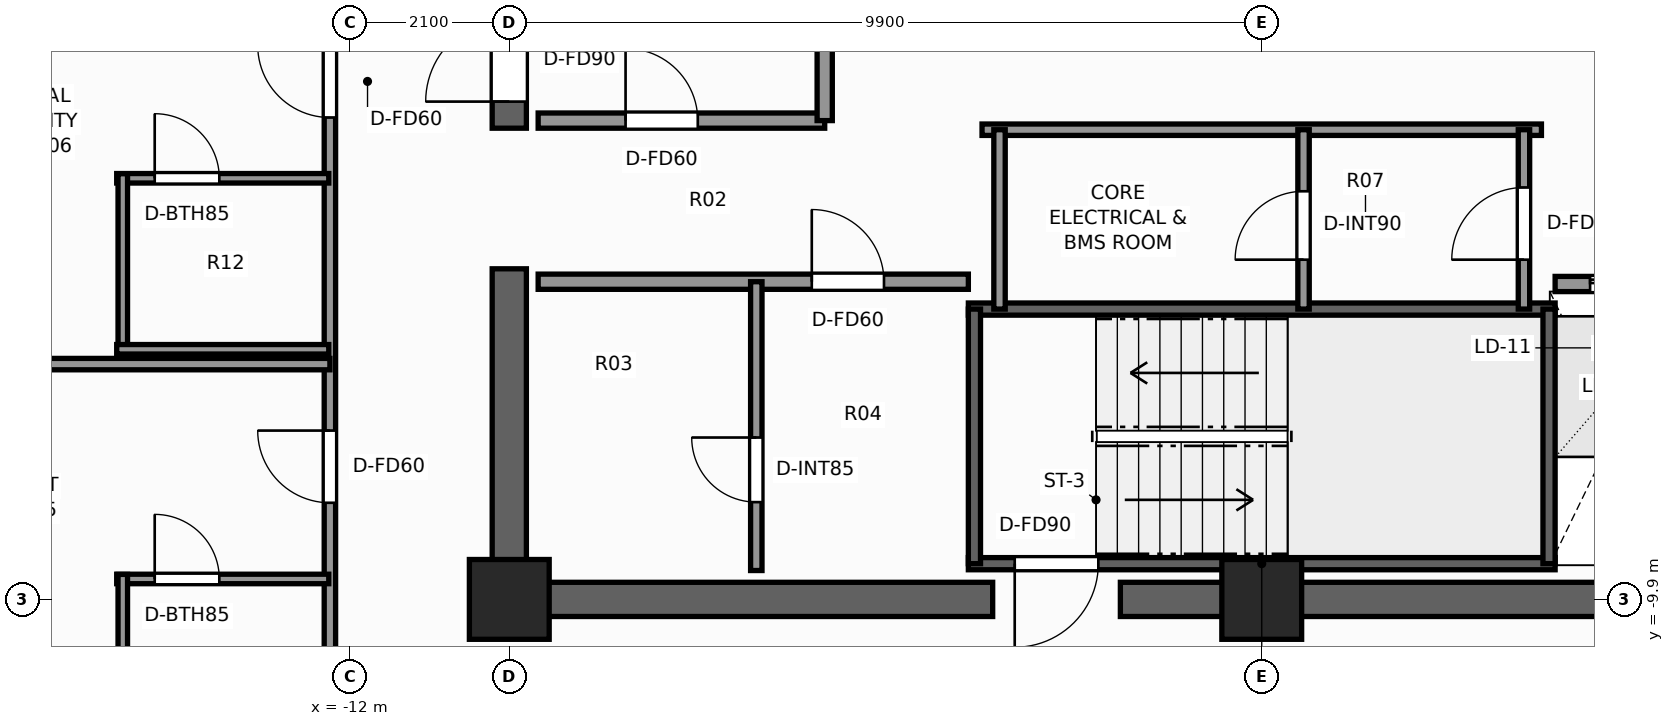
"""IFC4 building model, lengths in metres.
Left out: names, types, materials, properties, quantities, classifications, styles, units other than length and angle.
Written with IfcOpenShell. Run it as: python <this file> out.ifc"""

import sys

from ifc_helpers import new_model, si_unit, direction, frame, frame_2d, origin, origin_2d, place, context, subcontext, project, spatial, rectangle, extrude, element, fill, save


model = new_model("IFC4")
c1 = context("Model", 3, precision=1e-05, world=origin(), true_north=direction((0.0, 1.0)))
c2 = subcontext(c1, "Body", "Model", "MODEL_VIEW")
j1 = project(units=[si_unit("LENGTHUNIT", "METRE"), si_unit("PLANEANGLEUNIT", "RADIAN")], contexts=[c1])
p1 = place(None, origin())
s1 = spatial("IfcSite", under=j1, at=p1, CompositionType="ELEMENT")
p2 = place(p1, origin())
s2 = spatial("IfcBuilding", under=s1, at=p2, CompositionType="ELEMENT")
p3 = place(p2, frame((0.0, 0.0, 251.4)))
s3 = spatial("IfcBuildingStorey", under=s2, at=p3, CompositionType="ELEMENT", Elevation=251.4)
p4 = place(p3, frame((10.125, -9.9, 0.0), z_axis=(0.0, 0.0, 1.0), x_axis=(-1.0, 0.0, 0.0)))
e1 = element("IfcWall", 1, at=p4, inside=s3, PredefinedType="SHEAR", context=c2, shape_type="SweptSolid", body=[
    extrude(rectangle(XDim=11.985, YDim=0.45, at=frame_2d((5.993, 0.0))), origin(), (0.0, 0.0, 1.0), 3.5),
])
p5 = place(p3, frame((-3.54, -9.9, 0.0), z_axis=(0.0, 0.0, 1.0), x_axis=(-1.0, 0.0, 0.0)))
e2 = element("IfcWall", 2, at=p5, inside=s3, PredefinedType="SHEAR", context=c2, shape_type="SweptSolid", body=[
    extrude(rectangle(XDim=6.585, YDim=0.45, at=frame_2d((3.292, 0.0))), origin(), (0.0, 0.0, 1.0), 3.5),
])
p6 = place(p3, frame((-9.9, -9.675, 0.0), z_axis=(0.0, 0.0, 1.0), x_axis=(0.0, 1.0, 0.0)))
e3 = element("IfcWall", 3, at=p6, inside=s3, PredefinedType="SHEAR", context=c2, shape_type="SweptSolid", body=[
    extrude(rectangle(XDim=4.125, YDim=0.45, at=frame_2d((2.062, 0.0))), origin(), (0.0, 0.0, 1.0), 3.5),
])
p7 = place(p3, frame((-9.9, -3.7, 0.0), z_axis=(0.0, 0.0, 1.0), x_axis=(0.0, 1.0, 0.0)))
e4 = element("IfcWall", 4, at=p7, inside=s3, PredefinedType="SHEAR", context=c2, shape_type="SweptSolid", body=[
    extrude(rectangle(XDim=13.375, YDim=0.45, at=frame_2d((6.688, 0.0))), origin(), (0.0, 0.0, 1.0), 3.5),
])
p8 = place(p7, frame((0.35, 0.0, 0.0)))
e5 = element("IfcOpeningElement", 5, at=p8, cuts=e4, PredefinedType="OPENING", context=c2, shape_type="SweptSolid", body=[
    extrude(rectangle(XDim=1.1, YDim=2.2, at=frame_2d((0.55, 1.1))), frame((0.0, 0.235, 0.0), z_axis=(0.0, -1.0, 0.0), x_axis=(1.0, 0.0, 0.0)), (0.0, 0.0, 1.0), 0.47),
])
for number, where, z_axis, x_axis in (
    (6, (-9.9, -9.9, 0.0), (0.0, 0.0, 1.0), (1.0, 0.0, 0.0)),
    (7, (0.0, -9.9, 0.0), (0.0, 0.0, 1.0), (1.0, 0.0, 0.0)),
):
    element("IfcColumn", number, at=place(p3, frame(where, z_axis=z_axis, x_axis=x_axis)), inside=s3, PredefinedType="COLUMN", context=c2, shape_type="SweptSolid", body=[
        extrude(rectangle(XDim=1.05, YDim=1.05, at=origin_2d()), origin(), (0.0, 0.0, 1.0), 3.5),
    ])
p9 = place(p3, frame((3.86, -9.43, 0.0), z_axis=(0.0, 0.0, 1.0), x_axis=(-1.0, 0.0, 0.0)))
e8 = element("IfcWall", 8, at=p9, inside=s3, PredefinedType="SHEAR", context=c2, shape_type="SweptSolid", body=[
    extrude(rectangle(XDim=7.72, YDim=0.16, at=frame_2d((3.86, 0.0))), origin(), (0.0, 0.0, 1.0), 3.5),
])
p10 = place(p9, frame((6.01, 0.0, 0.0)))
e9 = element("IfcOpeningElement", 9, at=p10, cuts=e8, PredefinedType="OPENING", context=c2, shape_type="SweptSolid", body=[
    extrude(rectangle(XDim=1.1, YDim=2.2, at=frame_2d((0.55, 1.1))), frame((0.0, 0.09, 0.0), z_axis=(0.0, -1.0, 0.0), x_axis=(1.0, 0.0, 0.0)), (0.0, 0.0, 1.0), 0.18),
])
p11 = place(p3, frame((-3.86, -6.08, 0.0), z_axis=(0.0, 0.0, 1.0), x_axis=(1.0, 0.0, 0.0)))
e10 = element("IfcWall", 10, at=p11, inside=s3, PredefinedType="SHEAR", context=c2, shape_type="SweptSolid", body=[
    extrude(rectangle(XDim=7.72, YDim=0.16, at=frame_2d((3.86, 0.0))), origin(), (0.0, 0.0, 1.0), 3.5),
])
for number, where, z_axis, x_axis in (
    (11, (-3.78, -9.43, 0.0), (0.0, 0.0, 1.0), (0.0, 1.0, 0.0)),
    (12, (3.78, -9.43, 0.0), (0.0, 0.0, 1.0), (0.0, 1.0, 0.0)),
):
    element("IfcWall", number, at=place(p3, frame(where, z_axis=z_axis, x_axis=x_axis)), inside=s3, PredefinedType="SHEAR", context=c2, shape_type="SweptSolid", body=[
        extrude(rectangle(XDim=3.35, YDim=0.16, at=frame_2d((1.675, 0.0))), origin(), (0.0, 0.0, 1.0), 3.5),
    ])
p12 = place(p3, frame((-9.52, -3.6, 0.0), z_axis=(0.0, 0.0, 1.0), x_axis=(1.0, 0.0, 0.0)))
e13 = element("IfcWall", 13, at=p12, inside=s3, PredefinedType="SOLIDWALL", context=c2, shape_type="SweptSolid", body=[
    extrude(rectangle(XDim=3.77, YDim=0.2, at=frame_2d((1.885, 0.0))), origin(), (0.0, 0.0, 1.0), 3.25),
])
p13 = place(p12, frame((1.15, 0.0, 0.0)))
e14 = element("IfcOpeningElement", 14, at=p13, cuts=e13, PredefinedType="OPENING", context=c2, shape_type="SweptSolid", body=[
    extrude(rectangle(XDim=0.95, YDim=2.06, at=frame_2d((0.475, 1.03))), frame((0.0, 0.11, 0.0), z_axis=(0.0, -1.0, 0.0), x_axis=(1.0, 0.0, 0.0)), (0.0, 0.0, 1.0), 0.22),
])
p14 = place(p3, frame((-5.75, -3.6, 0.0), z_axis=(0.0, 0.0, 1.0), x_axis=(0.0, 1.0, 0.0)))
e15 = element("IfcWall", 15, at=p14, inside=s3, PredefinedType="SOLIDWALL", context=c2, shape_type="SweptSolid", body=[
    extrude(rectangle(XDim=5.57, YDim=0.2, at=frame_2d((2.785, 0.0))), origin(), (0.0, 0.0, 1.0), 3.25),
])
p15 = place(p14, frame((2.75, 0.0, 0.0)))
e16 = element("IfcOpeningElement", 16, at=p15, cuts=e15, PredefinedType="OPENING", context=c2, shape_type="SweptSolid", body=[
    extrude(rectangle(XDim=1.1, YDim=2.2, at=frame_2d((0.55, 1.1))), frame((0.0, 0.11, 0.0), z_axis=(0.0, -1.0, 0.0), x_axis=(1.0, 0.0, 0.0)), (0.0, 0.0, 1.0), 0.22),
])
p16 = place(p3, frame((-9.52, -5.72, 0.0), z_axis=(0.0, 0.0, 1.0), x_axis=(1.0, 0.0, 0.0)))
e17 = element("IfcWall", 17, at=p16, inside=s3, PredefinedType="SOLIDWALL", context=c2, shape_type="SweptSolid", body=[
    extrude(rectangle(XDim=5.66, YDim=0.2, at=frame_2d((2.83, 0.0))), origin(), (0.0, 0.0, 1.0), 3.25),
])
p17 = place(p16, frame((3.6, 0.0, 0.0)))
e18 = element("IfcOpeningElement", 18, at=p17, cuts=e17, PredefinedType="OPENING", context=c2, shape_type="SweptSolid", body=[
    extrude(rectangle(XDim=0.95, YDim=2.06, at=frame_2d((0.475, 1.03))), frame((0.0, 0.11, 0.0), z_axis=(0.0, -1.0, 0.0), x_axis=(1.0, 0.0, 0.0)), (0.0, 0.0, 1.0), 0.22),
])
p18 = place(p3, frame((-6.65, -9.52, 0.0), z_axis=(0.0, 0.0, 1.0), x_axis=(0.0, 1.0, 0.0)))
e19 = element("IfcWall", 19, at=p18, inside=s3, PredefinedType="PARTITIONING", context=c2, shape_type="SweptSolid", body=[
    extrude(rectangle(XDim=3.8, YDim=0.15, at=frame_2d((1.9, 0.0))), origin(), (0.0, 0.0, 1.0), 3.25),
])
p19 = place(p18, frame((0.9, 0.0, 0.0)))
e20 = element("IfcOpeningElement", 20, at=p19, cuts=e19, PredefinedType="OPENING", context=c2, shape_type="SweptSolid", body=[
    extrude(rectangle(XDim=0.85, YDim=2.03, at=frame_2d((0.425, 1.015))), frame((0.0, 0.085, 0.0), z_axis=(0.0, -1.0, 0.0), x_axis=(1.0, 0.0, 0.0)), (0.0, 0.0, 1.0), 0.17),
])
p20 = place(p3, frame((3.86, -5.75, 0.0), z_axis=(0.0, 0.0, 1.0), x_axis=(1.0, 0.0, 0.0)))
e21 = element("IfcWall", 21, at=p20, inside=s3, PredefinedType="SOLIDWALL", context=c2, shape_type="SweptSolid", body=[
    extrude(rectangle(XDim=5.66, YDim=0.2, at=frame_2d((2.83, 0.0))), origin(), (0.0, 0.0, 1.0), 3.25),
])
p21 = place(p20, frame((0.46, 0.0, 0.0)))
e22 = element("IfcOpeningElement", 22, at=p21, cuts=e21, PredefinedType="OPENING", context=c2, shape_type="SweptSolid", body=[
    extrude(rectangle(XDim=1.1, YDim=2.2, at=frame_2d((0.55, 1.1))), frame((0.0, 0.11, 0.0), z_axis=(0.0, -1.0, 0.0), x_axis=(1.0, 0.0, 0.0)), (0.0, 0.0, 1.0), 0.22),
])
p22 = place(p20, frame((2.39, 0.0, 0.0)))
e23 = element("IfcOpeningElement", 23, at=p22, cuts=e21, PredefinedType="OPENING", context=c2, shape_type="SweptSolid", body=[
    extrude(rectangle(XDim=1.1, YDim=2.2, at=frame_2d((0.55, 1.1))), frame((0.0, 0.11, 0.0), z_axis=(0.0, -1.0, 0.0), x_axis=(1.0, 0.0, 0.0)), (0.0, 0.0, 1.0), 0.22),
])
p23 = place(p20, frame((4.32, 0.0, 0.0)))
e24 = element("IfcOpeningElement", 24, at=p23, cuts=e21, PredefinedType="OPENING", context=c2, shape_type="SweptSolid", body=[
    extrude(rectangle(XDim=1.1, YDim=2.2, at=frame_2d((0.55, 1.1))), frame((0.0, 0.11, 0.0), z_axis=(0.0, -1.0, 0.0), x_axis=(1.0, 0.0, 0.0)), (0.0, 0.0, 1.0), 0.22),
])
p24 = place(p3, frame((-3.68, -3.72, 0.0), z_axis=(0.0, 0.0, 1.0), x_axis=(1.0, 0.0, 0.0)))
e25 = element("IfcWall", 25, at=p24, inside=s3, PredefinedType="PARTITIONING", context=c2, shape_type="SweptSolid", body=[
    extrude(rectangle(XDim=7.36, YDim=0.15, at=frame_2d((3.68, 0.0))), origin(), (0.0, 0.0, 1.0), 3.25),
])
p25 = place(p3, frame((3.45, -6.08, 0.0), z_axis=(0.0, 0.0, 1.0), x_axis=(0.0, 1.0, 0.0)))
e26 = element("IfcWall", 26, at=p25, inside=s3, PredefinedType="PARTITIONING", context=c2, shape_type="SweptSolid", body=[
    extrude(rectangle(XDim=2.36, YDim=0.15, at=frame_2d((1.18, 0.0))), origin(), (0.0, 0.0, 1.0), 3.25),
])
p26 = place(p25, frame((0.65, 0.0, 0.0)))
e27 = element("IfcOpeningElement", 27, at=p26, cuts=e26, PredefinedType="OPENING", context=c2, shape_type="SweptSolid", body=[
    extrude(rectangle(XDim=0.95, YDim=2.06, at=frame_2d((0.475, 1.03))), frame((0.0, 0.085, 0.0), z_axis=(0.0, -1.0, 0.0), x_axis=(1.0, 0.0, 0.0)), (0.0, 0.0, 1.0), 0.17),
])
p27 = place(p3, frame((-3.45, -6.08, 0.0), z_axis=(0.0, 0.0, 1.0), x_axis=(0.0, 1.0, 0.0)))
e28 = element("IfcWall", 28, at=p27, inside=s3, PredefinedType="PARTITIONING", context=c2, shape_type="SweptSolid", body=[
    extrude(rectangle(XDim=2.36, YDim=0.15, at=frame_2d((1.18, 0.0))), origin(), (0.0, 0.0, 1.0), 3.25),
])
p28 = place(p3, frame((0.55, -6.08, 0.0), z_axis=(0.0, 0.0, 1.0), x_axis=(0.0, 1.0, 0.0)))
e29 = element("IfcWall", 29, at=p28, inside=s3, PredefinedType="PARTITIONING", context=c2, shape_type="SweptSolid", body=[
    extrude(rectangle(XDim=2.36, YDim=0.15, at=frame_2d((1.18, 0.0))), origin(), (0.0, 0.0, 1.0), 3.25),
])
p29 = place(p28, frame((0.65, 0.0, 0.0)))
e30 = element("IfcOpeningElement", 30, at=p29, cuts=e29, PredefinedType="OPENING", context=c2, shape_type="SweptSolid", body=[
    extrude(rectangle(XDim=0.9, YDim=2.06, at=frame_2d((0.45, 1.03))), frame((0.0, 0.085, 0.0), z_axis=(0.0, -1.0, 0.0), x_axis=(1.0, 0.0, 0.0)), (0.0, 0.0, 1.0), 0.17),
])
p30 = place(p3, frame((-12.26, -12.26, 0.0), z_axis=(0.0, 0.0, 1.0), x_axis=(0.0, 1.0, 0.0)))
e31 = element("IfcWall", 31, at=p30, inside=s3, PredefinedType="PARTITIONING", context=c2, shape_type="SweptSolid", body=[
    extrude(rectangle(XDim=24.84, YDim=0.15, at=frame_2d((12.42, 0.0))), origin(), (0.0, 0.0, 1.0), 2.539),
])
p31 = place(p30, frame((3.631, 0.0, 0.0)))
e32 = element("IfcOpeningElement", 32, at=p31, cuts=e31, PredefinedType="OPENING", context=c2, shape_type="SweptSolid", body=[
    extrude(rectangle(XDim=0.95, YDim=2.06, at=frame_2d((0.475, 1.03))), frame((0.0, 0.085, 0.0), z_axis=(0.0, -1.0, 0.0), x_axis=(1.0, 0.0, 0.0)), (0.0, 0.0, 1.0), 0.17),
])
p32 = place(p30, frame((8.701, 0.0, 0.0)))
e33 = element("IfcOpeningElement", 33, at=p32, cuts=e31, PredefinedType="OPENING", context=c2, shape_type="SweptSolid", body=[
    extrude(rectangle(XDim=0.95, YDim=2.06, at=frame_2d((0.475, 1.03))), frame((0.0, 0.085, 0.0), z_axis=(0.0, -1.0, 0.0), x_axis=(1.0, 0.0, 0.0)), (0.0, 0.0, 1.0), 0.17),
])
p33 = place(p30, frame((14.031, 0.0, 0.0)))
e34 = element("IfcOpeningElement", 34, at=p33, cuts=e31, PredefinedType="OPENING", context=c2, shape_type="SweptSolid", body=[
    extrude(rectangle(XDim=0.95, YDim=2.06, at=frame_2d((0.475, 1.03))), frame((0.0, 0.085, 0.0), z_axis=(0.0, -1.0, 0.0), x_axis=(1.0, 0.0, 0.0)), (0.0, 0.0, 1.0), 0.17),
])
p34 = place(p30, frame((19.741, 0.0, 0.0)))
e35 = element("IfcOpeningElement", 35, at=p34, cuts=e31, PredefinedType="OPENING", context=c2, shape_type="SweptSolid", body=[
    extrude(rectangle(XDim=0.95, YDim=2.06, at=frame_2d((0.475, 1.03))), frame((0.0, 0.085, 0.0), z_axis=(0.0, -1.0, 0.0), x_axis=(1.0, 0.0, 0.0)), (0.0, 0.0, 1.0), 0.17),
])
p35 = place(p3, frame((-18.38, -6.804, 0.0), z_axis=(0.0, 0.0, 1.0), x_axis=(1.0, 0.0, 0.0)))
e36 = element("IfcWall", 36, at=p35, inside=s3, PredefinedType="PARTITIONING", context=c2, shape_type="SweptSolid", body=[
    extrude(rectangle(XDim=6.12, YDim=0.15, at=frame_2d((3.06, 0.0))), origin(), (0.0, 0.0, 1.0), 2.623),
])
p36 = place(p3, frame((-15.065, -9.631, 0.0), z_axis=(0.0, 0.0, 1.0), x_axis=(1.0, 0.0, 0.0)))
e37 = element("IfcWall", 37, at=p36, inside=s3, PredefinedType="PARTITIONING", context=c2, shape_type="SweptSolid", body=[
    extrude(rectangle(XDim=2.79, YDim=0.125, at=frame_2d((1.395, 0.0))), origin(), (0.0, 0.0, 1.0), 3.25),
])
p37 = place(p36, frame((0.5, 0.0, 0.0)))
e38 = element("IfcOpeningElement", 38, at=p37, cuts=e37, PredefinedType="OPENING", context=c2, shape_type="SweptSolid", body=[
    extrude(rectangle(XDim=0.85, YDim=2.03, at=frame_2d((0.425, 1.015))), frame((0.0, 0.073, 0.0), z_axis=(0.0, -1.0, 0.0), x_axis=(1.0, 0.0, 0.0)), (0.0, 0.0, 1.0), 0.145),
])
p38 = place(p3, frame((-14.985, -11.941, 0.0), z_axis=(0.0, 0.0, 1.0), x_axis=(0.0, 1.0, 0.0)))
e39 = element("IfcWall", 39, at=p38, inside=s3, PredefinedType="PARTITIONING", context=c2, shape_type="SweptSolid", body=[
    extrude(rectangle(XDim=2.37, YDim=0.125, at=frame_2d((1.185, 0.0))), origin(), (0.0, 0.0, 1.0), 2.539),
])
p39 = place(p3, frame((-15.065, -4.359, 0.0), z_axis=(0.0, 0.0, 1.0), x_axis=(1.0, 0.0, 0.0)))
e40 = element("IfcWall", 40, at=p39, inside=s3, PredefinedType="PARTITIONING", context=c2, shape_type="SweptSolid", body=[
    extrude(rectangle(XDim=2.79, YDim=0.125, at=frame_2d((1.395, 0.0))), origin(), (0.0, 0.0, 1.0), 2.539),
])
p40 = place(p39, frame((0.5, 0.0, 0.0)))
e41 = element("IfcOpeningElement", 41, at=p40, cuts=e40, PredefinedType="OPENING", context=c2, shape_type="SweptSolid", body=[
    extrude(rectangle(XDim=0.85, YDim=2.03, at=frame_2d((0.425, 1.015))), frame((0.0, 0.073, 0.0), z_axis=(0.0, -1.0, 0.0), x_axis=(1.0, 0.0, 0.0)), (0.0, 0.0, 1.0), 0.145),
])
p41 = place(p3, frame((-14.985, -6.669, 0.0), z_axis=(0.0, 0.0, 1.0), x_axis=(0.0, 1.0, 0.0)))
e42 = element("IfcWall", 42, at=p41, inside=s3, PredefinedType="PARTITIONING", context=c2, shape_type="SweptSolid", body=[
    extrude(rectangle(XDim=2.37, YDim=0.125, at=frame_2d((1.185, 0.0))), origin(), (0.0, 0.0, 1.0), 2.539),
])
p42 = place(p3, frame((-15.065, -6.609, 0.0), z_axis=(0.0, 0.0, 1.0), x_axis=(1.0, 0.0, 0.0)))
e43 = element("IfcWall", 43, at=p42, inside=s3, PredefinedType="PARTITIONING", context=c2, shape_type="SweptSolid", body=[
    extrude(rectangle(XDim=2.79, YDim=0.125, at=frame_2d((1.395, 0.0))), origin(), (0.0, 0.0, 1.0), 3.25),
])
p43 = place(p10, origin())
e44 = element("IfcDoor", 44, at=p43, inside=s3, OperationType="SINGLE_SWING_RIGHT", PredefinedType="DOOR", context=c2, shape_type="SweptSolid", body=[
    extrude(rectangle(XDim=1.1, YDim=2.2, at=frame_2d((0.55, 1.1))), frame((0.0, 0.025, 0.0), z_axis=(0.0, -1.0, 0.0), x_axis=(1.0, 0.0, 0.0)), (0.0, 0.0, 1.0), 0.05),
])
fill(e9, e44)
p44 = place(p8, origin())
e45 = element("IfcDoor", 45, at=p44, inside=s3, OperationType="SINGLE_SWING_LEFT", PredefinedType="DOOR", context=c2, shape_type="SweptSolid", body=[
    extrude(rectangle(XDim=1.1, YDim=2.2, at=frame_2d((0.55, 1.1))), frame((0.0, 0.025, 0.0), z_axis=(0.0, -1.0, 0.0), x_axis=(1.0, 0.0, 0.0)), (0.0, 0.0, 1.0), 0.05),
])
fill(e5, e45)
p45 = place(p17, origin())
e46 = element("IfcDoor", 46, at=p45, inside=s3, OperationType="SINGLE_SWING_LEFT", PredefinedType="DOOR", context=c2, shape_type="SweptSolid", body=[
    extrude(rectangle(XDim=0.95, YDim=2.06, at=frame_2d((0.475, 1.03))), frame((0.0, 0.025, 0.0), z_axis=(0.0, -1.0, 0.0), x_axis=(1.0, 0.0, 0.0)), (0.0, 0.0, 1.0), 0.05),
])
fill(e18, e46)
p46 = place(p19, origin())
e47 = element("IfcDoor", 47, at=p46, inside=s3, OperationType="SINGLE_SWING_RIGHT", PredefinedType="DOOR", context=c2, shape_type="SweptSolid", body=[
    extrude(rectangle(XDim=0.85, YDim=2.03, at=frame_2d((0.425, 1.015))), frame((0.0, 0.025, 0.0), z_axis=(0.0, -1.0, 0.0), x_axis=(1.0, 0.0, 0.0)), (0.0, 0.0, 1.0), 0.05),
])
fill(e20, e47)
p47 = place(p13, origin())
e48 = element("IfcDoor", 48, at=p47, inside=s3, OperationType="SINGLE_SWING_LEFT", PredefinedType="DOOR", context=c2, shape_type="SweptSolid", body=[
    extrude(rectangle(XDim=0.95, YDim=2.06, at=frame_2d((0.475, 1.03))), frame((0.0, 0.025, 0.0), z_axis=(0.0, -1.0, 0.0), x_axis=(1.0, 0.0, 0.0)), (0.0, 0.0, 1.0), 0.05),
])
fill(e14, e48)
p48 = place(p21, origin())
e49 = element("IfcDoor", 49, at=p48, inside=s3, OperationType="DOUBLE_DOOR_SLIDING", PredefinedType="DOOR", context=c2, shape_type="SweptSolid", body=[
    extrude(rectangle(XDim=1.1, YDim=2.2, at=frame_2d((0.55, 1.1))), frame((0.0, 0.025, 0.0), z_axis=(0.0, -1.0, 0.0), x_axis=(1.0, 0.0, 0.0)), (0.0, 0.0, 1.0), 0.05),
])
fill(e22, e49)
p49 = place(p26, origin())
e50 = element("IfcDoor", 50, at=p49, inside=s3, OperationType="SINGLE_SWING_LEFT", PredefinedType="DOOR", context=c2, shape_type="SweptSolid", body=[
    extrude(rectangle(XDim=0.95, YDim=2.06, at=frame_2d((0.475, 1.03))), frame((0.0, 0.025, 0.0), z_axis=(0.0, -1.0, 0.0), x_axis=(1.0, 0.0, 0.0)), (0.0, 0.0, 1.0), 0.05),
])
fill(e27, e50)
p50 = place(p29, origin())
e51 = element("IfcDoor", 51, at=p50, inside=s3, OperationType="SINGLE_SWING_LEFT", PredefinedType="DOOR", context=c2, shape_type="SweptSolid", body=[
    extrude(rectangle(XDim=0.9, YDim=2.06, at=frame_2d((0.45, 1.03))), frame((0.0, 0.025, 0.0), z_axis=(0.0, -1.0, 0.0), x_axis=(1.0, 0.0, 0.0)), (0.0, 0.0, 1.0), 0.05),
])
fill(e30, e51)
p51 = place(p37, origin())
e52 = element("IfcDoor", 52, at=p51, inside=s3, OperationType="SINGLE_SWING_LEFT", PredefinedType="DOOR", context=c2, shape_type="SweptSolid", body=[
    extrude(rectangle(XDim=0.85, YDim=2.03, at=frame_2d((0.425, 1.015))), frame((0.0, 0.025, 0.0), z_axis=(0.0, -1.0, 0.0), x_axis=(1.0, 0.0, 0.0)), (0.0, 0.0, 1.0), 0.05),
])
fill(e38, e52)
p52 = place(p31, origin())
e53 = element("IfcDoor", 53, at=p52, inside=s3, OperationType="SINGLE_SWING_RIGHT", PredefinedType="DOOR", context=c2, shape_type="SweptSolid", body=[
    extrude(rectangle(XDim=0.95, YDim=2.06, at=frame_2d((0.475, 1.03))), frame((0.0, 0.025, 0.0), z_axis=(0.0, -1.0, 0.0), x_axis=(1.0, 0.0, 0.0)), (0.0, 0.0, 1.0), 0.05),
])
fill(e32, e53)
p53 = place(p40, origin())
e54 = element("IfcDoor", 54, at=p53, inside=s3, OperationType="SINGLE_SWING_LEFT", PredefinedType="DOOR", context=c2, shape_type="SweptSolid", body=[
    extrude(rectangle(XDim=0.85, YDim=2.03, at=frame_2d((0.425, 1.015))), frame((0.0, 0.025, 0.0), z_axis=(0.0, -1.0, 0.0), x_axis=(1.0, 0.0, 0.0)), (0.0, 0.0, 1.0), 0.05),
])
fill(e41, e54)
p54 = place(p32, origin())
e55 = element("IfcDoor", 55, at=p54, inside=s3, OperationType="SINGLE_SWING_RIGHT", PredefinedType="DOOR", context=c2, shape_type="SweptSolid", body=[
    extrude(rectangle(XDim=0.95, YDim=2.06, at=frame_2d((0.475, 1.03))), frame((0.0, 0.025, 0.0), z_axis=(0.0, -1.0, 0.0), x_axis=(1.0, 0.0, 0.0)), (0.0, 0.0, 1.0), 0.05),
])
fill(e33, e55)
save(model, sys.argv[1])
